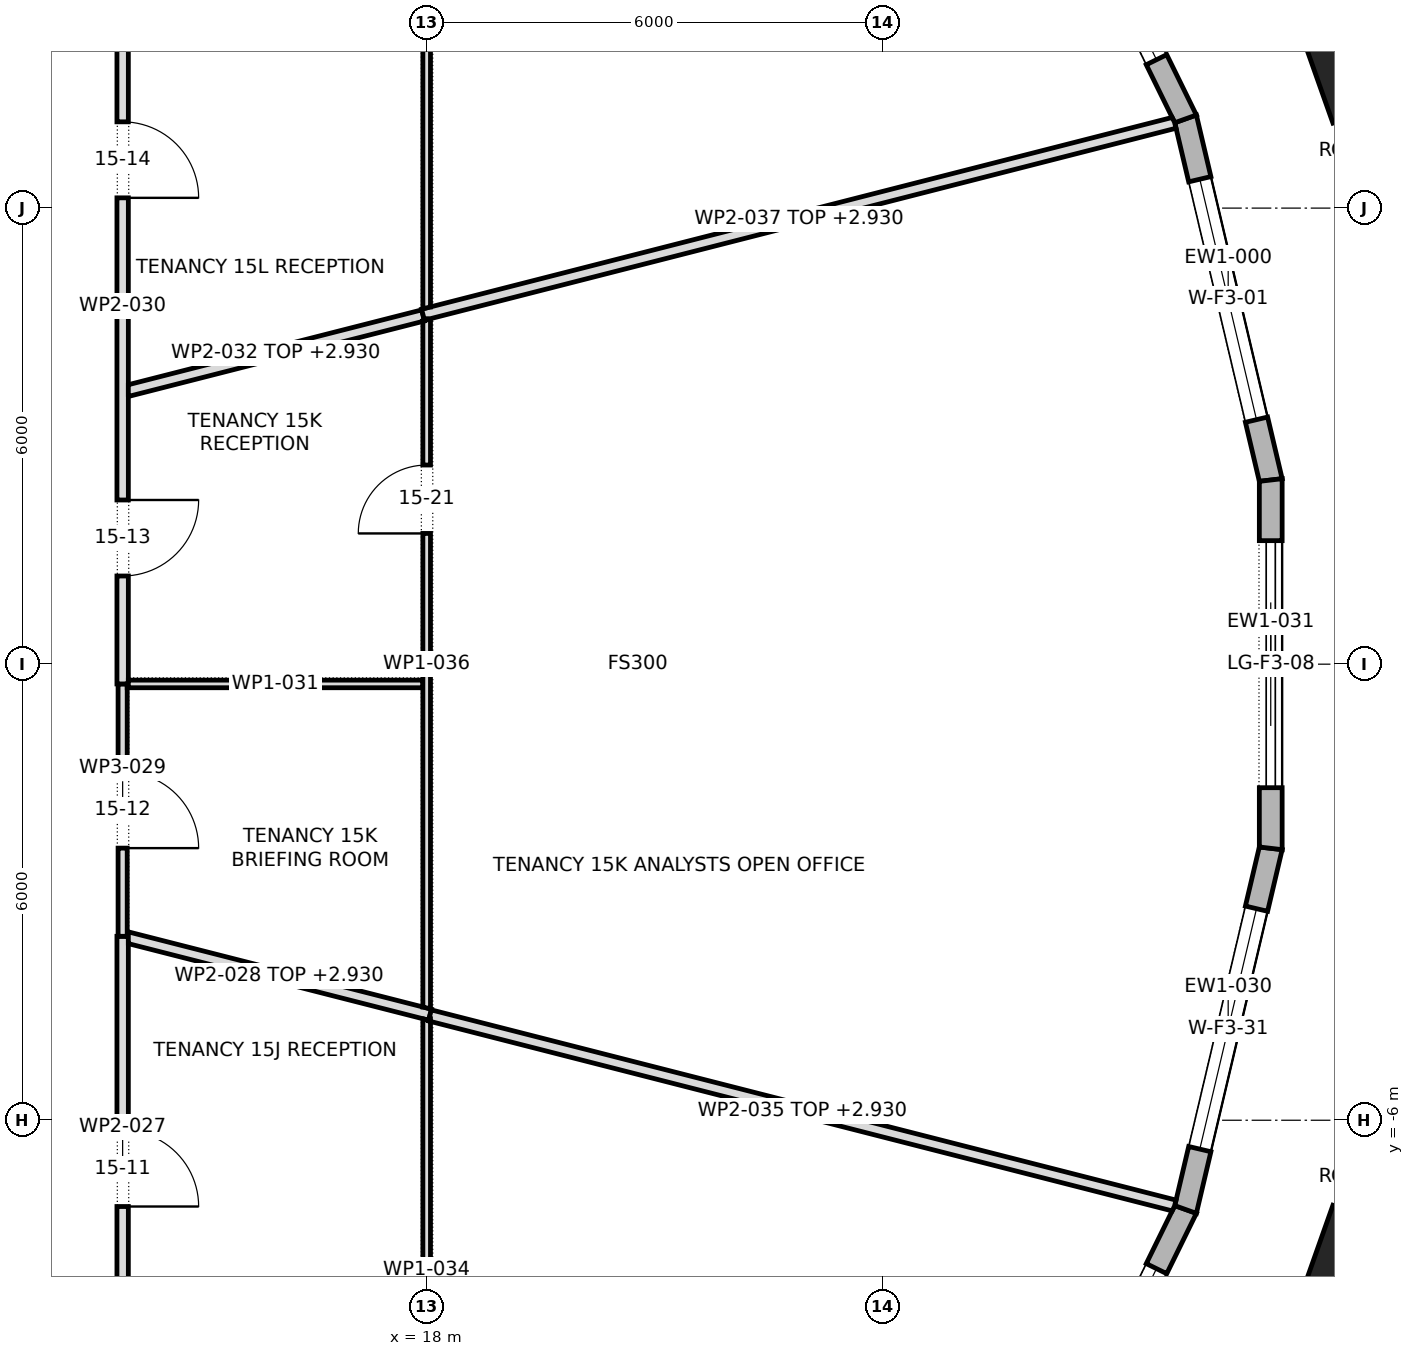
"""IFC4 building model, lengths in metres.
Left out: names, types, materials, properties, quantities, classifications, styles, units other than length and angle.
Written with IfcOpenShell. Run it as: python <this file> out.ifc"""

import sys

from ifc_helpers import new_model, si_unit, direction, frame, frame_2d, origin, origin_2d, place, context, subcontext, project, spatial, polyline, rectangle, outline, extrude, element, fill, save


model = new_model("IFC4")
c1 = context("Model", 3, precision=1e-05, world=origin(), true_north=direction((0.0, 1.0)))
c2 = subcontext(c1, "Body", "Model", "MODEL_VIEW")
j1 = project(units=[si_unit("LENGTHUNIT", "METRE"), si_unit("PLANEANGLEUNIT", "RADIAN")], contexts=[c1])
p1 = place(None, origin())
s1 = spatial("IfcSite", under=j1, at=p1, CompositionType="ELEMENT")
p2 = place(p1, origin())
s2 = spatial("IfcBuilding", under=s1, at=p2, CompositionType="ELEMENT")
p3 = place(p2, frame((0.0, 0.0, 222.9)))
s3 = spatial("IfcBuildingStorey", under=s2, at=p3, CompositionType="ELEMENT", Elevation=222.9)
for number, where, z_axis, x_axis in (
    (1, (30.194, 7.851, 0.0), (0.0, 0.0, 1.0), (-0.334, 0.943, 0.0)),
    (2, (30.194, -7.851, 0.0), (0.0, 0.0, 1.0), (0.334, 0.943, 0.0)),
):
    element("IfcColumn", number, at=place(p3, frame(where, z_axis=z_axis, x_axis=x_axis)), inside=s3, PredefinedType="COLUMN", context=c2, shape_type="SweptSolid", body=[
        extrude(rectangle(XDim=1.2, YDim=1.0, at=origin_2d()), origin(), (0.0, 0.0, 1.0), 4.0),
    ])
p4 = place(p3, frame((29.104, 2.423, 0.0), z_axis=(0.0, 0.0, 1.0), x_axis=(-0.229546618766, 0.97329766763, 0.0)))
e3 = element("IfcWall", 3, at=p4, inside=s3, PredefinedType="STANDARD", context=c2, shape_type="SweptSolid", body=[
    extrude(outline(polyline([(-0.017, -0.15), (4.899, -0.15), (4.865, 0.15), (0.017, 0.15), (-0.017, -0.15)])), origin(), (0.0, 0.0, 1.0), 3.7),
])
p5 = place(p4, frame((0.816, 0.0, 0.6)))
e4 = element("IfcOpeningElement", 4, at=p5, cuts=e3, PredefinedType="OPENING", context=c2, shape_type="SweptSolid", body=[
    extrude(rectangle(XDim=3.25, YDim=2.65, at=frame_2d((1.625, 1.325))), frame((0.0, 0.162, 0.0), z_axis=(0.0, -1.0, 0.0), x_axis=(1.0, 0.0, 0.0)), (0.0, 0.0, 1.0), 0.324),
])
p6 = place(p3, frame((27.984, 7.174, 0.0), z_axis=(0.0, 0.0, 1.0), x_axis=(-0.440795186599, 0.897607711348, 0.0)))
e5 = element("IfcWall", 5, at=p6, inside=s3, PredefinedType="STANDARD", context=c2, shape_type="SweptSolid", body=[
    extrude(outline(polyline([(-0.017, -0.15), (5.0, -0.15), (4.968, 0.15), (0.017, 0.15), (-0.017, -0.15)])), origin(), (0.0, 0.0, 1.0), 3.7),
])
p7 = place(p6, frame((0.867, 0.0, 0.6)))
e6 = element("IfcOpeningElement", 6, at=p7, cuts=e5, PredefinedType="OPENING", context=c2, shape_type="SweptSolid", body=[
    extrude(rectangle(XDim=3.25, YDim=2.65, at=frame_2d((1.625, 1.325))), frame((0.0, 0.162, 0.0), z_axis=(0.0, -1.0, 0.0), x_axis=(1.0, 0.0, 0.0)), (0.0, 0.0, 1.0), 0.324),
])
p8 = place(p3, frame((25.787, -11.648, 0.0), z_axis=(0.0, 0.0, 1.0), x_axis=(0.440795186599, 0.897607711348, 0.0)))
e7 = element("IfcWall", 7, at=p8, inside=s3, PredefinedType="STANDARD", context=c2, shape_type="SweptSolid", body=[
    extrude(outline(polyline([(-0.016, -0.15), (5.001, -0.15), (4.967, 0.15), (0.016, 0.15), (-0.016, -0.15)])), origin(), (0.0, 0.0, 1.0), 3.7),
])
p9 = place(p8, frame((0.867, 0.0, 0.6)))
e8 = element("IfcOpeningElement", 8, at=p9, cuts=e7, PredefinedType="OPENING", context=c2, shape_type="SweptSolid", body=[
    extrude(rectangle(XDim=3.25, YDim=2.65, at=frame_2d((1.625, 1.325))), frame((0.0, 0.162, 0.0), z_axis=(0.0, -1.0, 0.0), x_axis=(1.0, 0.0, 0.0)), (0.0, 0.0, 1.0), 0.324),
])
p10 = place(p3, frame((27.984, -7.174, 0.0), z_axis=(0.0, 0.0, 1.0), x_axis=(0.229546618766, 0.97329766763, 0.0)))
e9 = element("IfcWall", 9, at=p10, inside=s3, PredefinedType="STANDARD", context=c2, shape_type="SweptSolid", body=[
    extrude(outline(polyline([(-0.017, -0.15), (4.899, -0.15), (4.865, 0.15), (0.017, 0.15), (-0.017, -0.15)])), origin(), (0.0, 0.0, 1.0), 3.7),
])
p11 = place(p10, frame((0.816, 0.0, 0.6)))
e10 = element("IfcOpeningElement", 10, at=p11, cuts=e9, PredefinedType="OPENING", context=c2, shape_type="SweptSolid", body=[
    extrude(rectangle(XDim=3.25, YDim=2.65, at=frame_2d((1.625, 1.325))), frame((0.0, 0.162, 0.0), z_axis=(0.0, -1.0, 0.0), x_axis=(1.0, 0.0, 0.0)), (0.0, 0.0, 1.0), 0.324),
])
p12 = place(p3, frame((29.104, -2.423, 0.0), z_axis=(0.0, 0.0, 1.0), x_axis=(0.0, 1.0, 0.0)))
e11 = element("IfcWall", 11, at=p12, inside=s3, PredefinedType="STANDARD", context=c2, shape_type="SweptSolid", body=[
    extrude(outline(polyline([(-0.017, -0.15), (4.863, -0.15), (4.828, 0.15), (0.017, 0.15), (-0.017, -0.15)])), origin(), (0.0, 0.0, 1.0), 3.7),
])
p13 = place(p12, frame((0.798, 0.0, 0.0)))
e12 = element("IfcOpeningElement", 12, at=p13, cuts=e11, PredefinedType="OPENING", context=c2, shape_type="SweptSolid", body=[
    extrude(rectangle(XDim=3.25, YDim=3.25, at=frame_2d((1.625, 1.625))), frame((0.0, 0.162, 0.0), z_axis=(0.0, -1.0, 0.0), x_axis=(1.0, 0.0, 0.0)), (0.0, 0.0, 1.0), 0.324),
])
p14 = place(p3, frame((14.0, -3.58, 0.0), z_axis=(0.0, 0.0, 1.0), x_axis=(0.0, -1.0, 0.0)))
e13 = element("IfcWall", 13, at=p14, inside=s3, PredefinedType="PARTITIONING", context=c2, shape_type="SweptSolid", body=[
    extrude(outline(polyline([(6.149, -0.075), (6.149, -0.075), (6.071, 0.075), (4.553, 0.075), (3.035, 0.075), (1.518, 0.075), (0.0, 0.075), (0.0, -0.075), (1.537, -0.075), (3.075, -0.075), (4.612, -0.075), (6.149, -0.075)])), origin(), (0.0, 0.0, 1.0), 3.7),
])
p15 = place(p14, frame((2.555, 0.0, 0.0)))
e14 = element("IfcOpeningElement", 14, at=p15, cuts=e13, PredefinedType="OPENING", context=c2, shape_type="SweptSolid", body=[
    extrude(rectangle(XDim=1.0, YDim=2.1, at=frame_2d((0.5, 1.05))), frame((0.0, 0.087, 0.0), z_axis=(0.0, -1.0, 0.0), x_axis=(1.0, 0.0, 0.0)), (0.0, 0.0, 1.0), 0.174),
])
p16 = place(p3, frame((14.042, -3.591, 0.0), z_axis=(0.0, 0.0, 1.0), x_axis=(0.968991510142, -0.247094017071, 0.0)))
e15 = element("IfcWall", 15, at=p16, inside=s3, PredefinedType="PARTITIONING", context=c2, shape_type="SweptSolid", body=[
    extrude(outline(polyline([(4.131, 0.075), (4.015, 0.075), (4.014, 0.075), (4.014, 0.075), (2.676, 0.075), (1.338, 0.075), (0.0, 0.075), (0.0, 0.074), (0.015, 0.015), (0.03, 0.019), (0.053, -0.075), (1.413, -0.075), (2.772, -0.075), (4.131, -0.075), (4.131, 0.075)])), origin(), (0.0, 0.0, 1.0), 2.93),
])
p17 = place(p3, frame((14.0, -0.26, 0.0), z_axis=(0.0, 0.0, 1.0), x_axis=(0.0, -1.0, 0.0)))
e16 = element("IfcWall", 16, at=p17, inside=s3, PredefinedType="PARTITIONING", context=c2, shape_type="SweptSolid", body=[
    extrude(rectangle(XDim=3.32, YDim=0.12, at=frame_2d((1.66, 0.0))), origin(), (0.0, 0.0, 1.0), 3.7),
])
p18 = place(p17, frame((1.16, 0.0, 0.0)))
e17 = element("IfcOpeningElement", 17, at=p18, cuts=e16, PredefinedType="OPENING", context=c2, shape_type="SweptSolid", body=[
    extrude(rectangle(XDim=1.0, YDim=2.1, at=frame_2d((0.5, 1.05))), frame((0.0, 0.072, 0.0), z_axis=(0.0, -1.0, 0.0), x_axis=(1.0, 0.0, 0.0)), (0.0, 0.0, 1.0), 0.144),
])
p19 = place(p3, frame((14.0, -0.26, 0.0), z_axis=(0.0, 0.0, 1.0), x_axis=(0.0, 1.0, 0.0)))
e18 = element("IfcWall", 18, at=p19, inside=s3, PredefinedType="PARTITIONING", context=c2, shape_type="SweptSolid", body=[
    extrude(outline(polyline([(0.0, -0.075), (1.982, -0.075), (3.964, -0.075), (5.947, -0.075), (7.929, -0.075), (9.911, -0.075), (9.989, 0.075), (9.989, 0.075), (7.991, 0.075), (5.994, 0.075), (3.996, 0.075), (1.998, 0.075), (0.0, 0.075), (0.0, -0.075)])), origin(), (0.0, 0.0, 1.0), 3.7),
])
p20 = place(p19, frame((1.42, 0.0, 0.0)))
e19 = element("IfcOpeningElement", 19, at=p20, cuts=e18, PredefinedType="OPENING", context=c2, shape_type="SweptSolid", body=[
    extrude(rectangle(XDim=1.0, YDim=2.1, at=frame_2d((0.5, 1.05))), frame((0.0, 0.087, 0.0), z_axis=(0.0, -1.0, 0.0), x_axis=(1.0, 0.0, 0.0)), (0.0, 0.0, 1.0), 0.174),
])
p21 = place(p19, frame((6.395, 0.0, 0.0)))
e20 = element("IfcOpeningElement", 20, at=p21, cuts=e18, PredefinedType="OPENING", context=c2, shape_type="SweptSolid", body=[
    extrude(rectangle(XDim=1.0, YDim=2.1, at=frame_2d((0.5, 1.05))), frame((0.0, 0.087, 0.0), z_axis=(0.0, -1.0, 0.0), x_axis=(1.0, 0.0, 0.0)), (0.0, 0.0, 1.0), 0.174),
])
p22 = place(p3, frame((14.061, -0.26, 0.0), z_axis=(0.0, 0.0, 1.0), x_axis=(1.0, 0.0, 0.0)))
e21 = element("IfcWall", 21, at=p22, inside=s3, PredefinedType="PARTITIONING", context=c2, shape_type="SweptSolid", body=[
    extrude(outline(polyline([(3.889, 0.05), (1.952, 0.05), (0.014, 0.05), (0.014, 0.0), (0.0, 0.0), (0.0, -0.05), (1.945, -0.05), (3.889, -0.05), (3.889, 0.05)])), origin(), (0.0, 0.0, 1.0), 3.7),
])
p23 = place(p3, frame((14.057, 3.594, 0.0), z_axis=(0.0, 0.0, 1.0), x_axis=(0.968992302027, 0.247090911634, 0.0)))
e22 = element("IfcWall", 22, at=p23, inside=s3, PredefinedType="PARTITIONING", context=c2, shape_type="SweptSolid", body=[
    extrude(outline(polyline([(0.0, -0.075), (2.0, -0.075), (3.999, -0.075), (3.999, -0.073), (4.005, -0.075), (4.021, -0.075), (4.021, 0.075), (2.029, 0.075), (0.038, 0.075), (0.0, -0.074), (0.0, -0.075)])), origin(), (0.0, 0.0, 1.0), 2.93),
])
p24 = place(p3, frame((18.0, -4.665, 0.0), z_axis=(0.0, 0.0, 1.0), x_axis=(0.0, -1.0, 0.0)))
e23 = element("IfcWall", 23, at=p24, inside=s3, PredefinedType="PARTITIONING", context=c2, shape_type="SweptSolid", body=[
    extrude(outline(polyline([(0.0, -0.05), (1.917, -0.05), (3.834, -0.05), (5.751, -0.05), (7.668, -0.05), (7.737, 0.05), (7.737, 0.05), (5.812, 0.05), (3.886, 0.05), (1.961, 0.05), (0.035, 0.05), (0.029, 0.025), (0.0, 0.032), (0.0, 0.031), (0.019, 0.026), (0.0, -0.048), (0.0, -0.05)])), origin(), (0.0, 0.0, 1.0), 3.7),
])
p25 = place(p24, frame((3.42, 0.0, 0.0)))
e24 = element("IfcOpeningElement", 24, at=p25, cuts=e23, PredefinedType="OPENING", context=c2, shape_type="SweptSolid", body=[
    extrude(rectangle(XDim=0.9, YDim=2.1, at=frame_2d((0.45, 1.05))), frame((0.0, 0.062, 0.0), z_axis=(0.0, -1.0, 0.0), x_axis=(1.0, 0.0, 0.0)), (0.0, 0.0, 1.0), 0.124),
])
p26 = place(p3, frame((18.042, -4.621, 0.0), z_axis=(0.0, 0.0, 1.0), x_axis=(0.968898746972, -0.247457507698, 0.0)))
e25 = element("IfcWall", 25, at=p26, inside=s3, PredefinedType="PARTITIONING", context=c2, shape_type="SweptSolid", body=[
    extrude(outline(polyline([(0.027, -0.075), (1.706, -0.075), (3.385, -0.075), (5.063, -0.075), (6.741, -0.075), (8.42, -0.075), (10.098, -0.075), (10.113, -0.008), (10.113, 0.075), (8.427, 0.075), (6.742, 0.075), (5.056, 0.075), (3.371, 0.075), (1.686, 0.075), (0.0, 0.075), (0.0, -0.045), (0.019, -0.041), (0.027, -0.075)])), origin(), (0.0, 0.0, 1.0), 2.93),
])
p27 = place(p3, frame((18.0, -4.535, 0.0), z_axis=(0.0, 0.0, 1.0), x_axis=(0.0, 1.0, 0.0)))
e26 = element("IfcWall", 26, at=p27, inside=s3, PredefinedType="PARTITIONING", context=c2, shape_type="SweptSolid", body=[
    extrude(outline(polyline([(9.08, -0.05), (9.08, -0.048), (9.06, 0.03), (9.08, 0.035), (9.08, 0.036), (9.05, 0.029), (9.045, 0.05), (7.471, 0.05), (5.898, 0.05), (4.325, 0.05), (4.325, 0.05), (4.225, 0.05), (4.225, 0.05), (2.825, 0.05), (1.425, 0.05), (0.025, 0.05), (0.0, -0.048), (0.0, -0.05), (1.816, -0.05), (3.632, -0.05), (5.448, -0.05), (7.264, -0.05), (9.08, -0.05)])), origin(), (0.0, 0.0, 1.0), 3.7),
])
p28 = place(p27, frame((6.255, 0.0, 0.0)))
e27 = element("IfcOpeningElement", 27, at=p28, cuts=e26, PredefinedType="OPENING", context=c2, shape_type="SweptSolid", body=[
    extrude(rectangle(XDim=0.9, YDim=2.1, at=frame_2d((0.45, 1.05))), frame((0.0, 0.062, 0.0), z_axis=(0.0, -1.0, 0.0), x_axis=(1.0, 0.0, 0.0)), (0.0, 0.0, 1.0), 0.124),
])
p29 = place(p3, frame((17.952, 4.598, 0.0), z_axis=(0.0, 0.0, 1.0), x_axis=(0.968895869382, 0.247468774381, 0.0)))
e28 = element("IfcWall", 28, at=p29, inside=s3, PredefinedType="PARTITIONING", context=c2, shape_type="SweptSolid", body=[
    extrude(outline(polyline([(10.206, -0.075), (10.206, 0.008), (10.192, 0.075), (8.513, 0.075), (6.835, 0.075), (5.156, 0.075), (3.478, 0.075), (1.799, 0.075), (0.121, 0.075), (0.121, 0.075), (0.12, 0.075), (0.0, 0.075), (0.0, -0.054), (0.081, -0.075), (1.768, -0.075), (3.456, -0.075), (5.143, -0.075), (6.831, -0.075), (8.518, -0.075), (10.206, -0.075)])), origin(), (0.0, 0.0, 1.0), 2.93),
])
p30 = place(p3, frame((18.0, 12.402, 0.0), z_axis=(0.0, 0.0, 1.0), x_axis=(0.0, -1.0, 0.0)))
e29 = element("IfcWall", 29, at=p30, inside=s3, PredefinedType="PARTITIONING", context=c2, shape_type="SweptSolid", body=[
    extrude(outline(polyline([(7.727, -0.05), (7.727, -0.048), (7.702, 0.05), (5.776, 0.05), (3.851, 0.05), (1.926, 0.05), (0.0, 0.05), (0.0, 0.05), (0.069, -0.05), (1.984, -0.05), (3.898, -0.05), (5.812, -0.05), (7.727, -0.05)])), origin(), (0.0, 0.0, 1.0), 3.7),
])
p31 = place(p30, frame((3.417, 0.0, 0.0)))
e30 = element("IfcOpeningElement", 30, at=p31, cuts=e29, PredefinedType="OPENING", context=c2, shape_type="SweptSolid", body=[
    extrude(rectangle(XDim=0.9, YDim=2.1, at=frame_2d((0.45, 1.05))), frame((0.0, 0.062, 0.0), z_axis=(0.0, -1.0, 0.0), x_axis=(1.0, 0.0, 0.0)), (0.0, 0.0, 1.0), 0.124),
])
p32 = place(p5, origin())
e31 = element("IfcWindow", 31, at=p32, inside=s3, PartitioningType="TRIPLE_PANEL_VERTICAL", PredefinedType="WINDOW", context=c2, shape_type="SweptSolid", body=[
    extrude(rectangle(XDim=3.25, YDim=2.65, at=frame_2d((1.625, 1.325))), frame((0.0, 0.03, 0.0), z_axis=(0.0, -1.0, 0.0), x_axis=(1.0, 0.0, 0.0)), (0.0, 0.0, 1.0), 0.06),
])
fill(e4, e31)
p33 = place(p7, origin())
e32 = element("IfcWindow", 32, at=p33, inside=s3, PartitioningType="TRIPLE_PANEL_VERTICAL", PredefinedType="WINDOW", context=c2, shape_type="SweptSolid", body=[
    extrude(rectangle(XDim=3.25, YDim=2.65, at=frame_2d((1.625, 1.325))), frame((0.0, 0.03, 0.0), z_axis=(0.0, -1.0, 0.0), x_axis=(1.0, 0.0, 0.0)), (0.0, 0.0, 1.0), 0.06),
])
fill(e6, e32)
p34 = place(p9, origin())
e33 = element("IfcWindow", 33, at=p34, inside=s3, PartitioningType="TRIPLE_PANEL_VERTICAL", PredefinedType="WINDOW", context=c2, shape_type="SweptSolid", body=[
    extrude(rectangle(XDim=3.25, YDim=2.65, at=frame_2d((1.625, 1.325))), frame((0.0, 0.03, 0.0), z_axis=(0.0, -1.0, 0.0), x_axis=(1.0, 0.0, 0.0)), (0.0, 0.0, 1.0), 0.06),
])
fill(e8, e33)
p35 = place(p11, origin())
e34 = element("IfcWindow", 34, at=p35, inside=s3, PartitioningType="TRIPLE_PANEL_VERTICAL", PredefinedType="WINDOW", context=c2, shape_type="SweptSolid", body=[
    extrude(rectangle(XDim=3.25, YDim=2.65, at=frame_2d((1.625, 1.325))), frame((0.0, 0.03, 0.0), z_axis=(0.0, -1.0, 0.0), x_axis=(1.0, 0.0, 0.0)), (0.0, 0.0, 1.0), 0.06),
])
fill(e10, e34)
p36 = place(p13, origin())
e35 = element("IfcDoor", 35, at=p36, inside=s3, OperationType="DOUBLE_DOOR_SLIDING", PredefinedType="DOOR", context=c2, shape_type="SweptSolid", body=[
    extrude(rectangle(XDim=3.25, YDim=3.25, at=frame_2d((1.625, 1.625))), frame((0.0, 0.025, 0.0), z_axis=(0.0, -1.0, 0.0), x_axis=(1.0, 0.0, 0.0)), (0.0, 0.0, 1.0), 0.05),
])
fill(e12, e35)
p37 = place(p15, origin())
e36 = element("IfcDoor", 36, at=p37, inside=s3, OperationType="SINGLE_SWING_LEFT", PredefinedType="DOOR", context=c2, shape_type="SweptSolid", body=[
    extrude(rectangle(XDim=1.0, YDim=2.1, at=frame_2d((0.5, 1.05))), frame((0.0, 0.025, 0.0), z_axis=(0.0, -1.0, 0.0), x_axis=(1.0, 0.0, 0.0)), (0.0, 0.0, 1.0), 0.05),
])
fill(e14, e36)
p38 = place(p18, origin())
e37 = element("IfcDoor", 37, at=p38, inside=s3, OperationType="SINGLE_SWING_LEFT", PredefinedType="DOOR", context=c2, shape_type="SweptSolid", body=[
    extrude(rectangle(XDim=1.0, YDim=2.1, at=frame_2d((0.5, 1.05))), frame((0.0, 0.025, 0.0), z_axis=(0.0, -1.0, 0.0), x_axis=(1.0, 0.0, 0.0)), (0.0, 0.0, 1.0), 0.05),
])
fill(e17, e37)
p39 = place(p20, frame((1.0, 0.0, 0.0), z_axis=(0.0, 0.0, 1.0), x_axis=(-1.0, 0.0, 0.0)))
e38 = element("IfcDoor", 38, at=p39, inside=s3, OperationType="SINGLE_SWING_RIGHT", PredefinedType="DOOR", context=c2, shape_type="SweptSolid", body=[
    extrude(rectangle(XDim=1.0, YDim=2.1, at=frame_2d((0.5, 1.05))), frame((0.0, 0.025, 0.0), z_axis=(0.0, -1.0, 0.0), x_axis=(1.0, 0.0, 0.0)), (0.0, 0.0, 1.0), 0.05),
])
fill(e19, e38)
p40 = place(p21, frame((1.0, 0.0, 0.0), z_axis=(0.0, 0.0, 1.0), x_axis=(-1.0, 0.0, 0.0)))
e39 = element("IfcDoor", 39, at=p40, inside=s3, OperationType="SINGLE_SWING_LEFT", PredefinedType="DOOR", context=c2, shape_type="SweptSolid", body=[
    extrude(rectangle(XDim=1.0, YDim=2.1, at=frame_2d((0.5, 1.05))), frame((0.0, 0.025, 0.0), z_axis=(0.0, -1.0, 0.0), x_axis=(1.0, 0.0, 0.0)), (0.0, 0.0, 1.0), 0.05),
])
fill(e20, e39)
p41 = place(p28, origin())
e40 = element("IfcDoor", 40, at=p41, inside=s3, OperationType="SINGLE_SWING_RIGHT", PredefinedType="DOOR", context=c2, shape_type="SweptSolid", body=[
    extrude(rectangle(XDim=0.9, YDim=2.1, at=frame_2d((0.45, 1.05))), frame((0.0, 0.025, 0.0), z_axis=(0.0, -1.0, 0.0), x_axis=(1.0, 0.0, 0.0)), (0.0, 0.0, 1.0), 0.05),
])
fill(e27, e40)
save(model, sys.argv[1])
